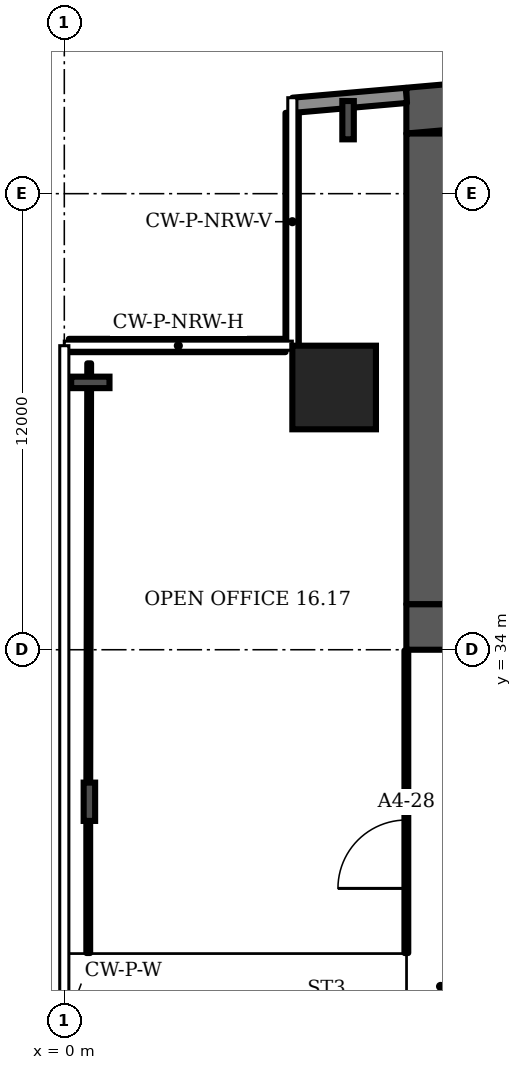
"""IFC4 building model, lengths in metres.
Left out: names, types, materials, properties, quantities, classifications, styles, units other than length and angle.
Written with IfcOpenShell. Run it as: python <this file> out.ifc"""

import sys

from ifc_helpers import new_model, si_unit, direction, frame, frame_2d, origin, origin_2d, place, context, subcontext, project, spatial, polyline, rectangle, i_section, outline, extrude, element, fill, save


model = new_model("IFC4")
c1 = context("Model", 3, precision=1e-05, world=origin(), true_north=direction((0.0, 1.0)))
c2 = subcontext(c1, "Body", "Model", "MODEL_VIEW")
j1 = project(units=[si_unit("LENGTHUNIT", "METRE"), si_unit("PLANEANGLEUNIT", "RADIAN")], contexts=[c1])
p1 = place(None, origin())
s1 = spatial("IfcSite", under=j1, at=p1, CompositionType="ELEMENT")
p2 = place(p1, origin())
s2 = spatial("IfcBuilding", under=s1, at=p2, CompositionType="ELEMENT")
p3 = place(p2, frame((0.0, 0.0, 77.5)))
s3 = spatial("IfcBuildingStorey", under=s2, at=p3, CompositionType="ELEMENT", Elevation=77.5)
p4 = place(p3, origin())
e1 = element("IfcWall", 1, at=p4, inside=s3, PredefinedType="SHEAR", context=c2, shape_type="SweptSolid", body=[
    extrude(outline(polyline([(9.0, 47.583), (37.0, 50.032), (65.0, 47.583), (65.0, 48.787), (37.0, 51.237), (9.0, 48.787), (9.0, 47.583)])), origin(), (0.0, 0.0, 1.0), 3.6),
])
p5 = place(p3, frame((9.0, 34.6, 0.0), z_axis=(0.0, 0.0, 1.0), x_axis=(1.0, 0.0, 0.0)))
e2 = element("IfcWall", 2, at=p5, inside=s3, PredefinedType="SHEAR", context=c2, shape_type="SweptSolid", body=[
    extrude(rectangle(XDim=56.0, YDim=1.2, at=frame_2d((28.0, 0.0))), origin(), (0.0, 0.0, 1.0), 3.6),
])
p6 = place(p5, frame((3.3, 0.0, 0.0)))
e3 = element("IfcOpeningElement", 3, at=p6, cuts=e2, PredefinedType="OPENING", context=c2, shape_type="SweptSolid", body=[
    extrude(rectangle(XDim=1.0, YDim=2.1, at=frame_2d((0.5, 1.05))), frame((0.0, 0.61, 0.0), z_axis=(0.0, -1.0, 0.0), x_axis=(1.0, 0.0, 0.0)), (0.0, 0.0, 1.0), 1.22),
])
p7 = place(p5, frame((7.867, 0.0, 0.0)))
e4 = element("IfcOpeningElement", 4, at=p7, cuts=e2, PredefinedType="OPENING", context=c2, shape_type="SweptSolid", body=[
    extrude(rectangle(XDim=1.1, YDim=2.1, at=frame_2d((0.55, 1.05))), frame((0.0, 0.61, 0.0), z_axis=(0.0, -1.0, 0.0), x_axis=(1.0, 0.0, 0.0)), (0.0, 0.0, 1.0), 1.22),
])
p8 = place(p5, frame((12.033, 0.0, 0.0)))
e5 = element("IfcOpeningElement", 5, at=p8, cuts=e2, PredefinedType="OPENING", context=c2, shape_type="SweptSolid", body=[
    extrude(rectangle(XDim=1.1, YDim=2.1, at=frame_2d((0.55, 1.05))), frame((0.0, 0.61, 0.0), z_axis=(0.0, -1.0, 0.0), x_axis=(1.0, 0.0, 0.0)), (0.0, 0.0, 1.0), 1.22),
])
p9 = place(p5, frame((9.8, 0.0, 0.0)))
e6 = element("IfcOpeningElement", 6, at=p9, cuts=e2, PredefinedType="OPENING", context=c2, shape_type="SweptSolid", body=[
    extrude(rectangle(XDim=1.4, YDim=2.1, at=frame_2d((0.7, 1.05))), frame((0.0, 0.61, 0.0), z_axis=(0.0, -1.0, 0.0), x_axis=(1.0, 0.0, 0.0)), (0.0, 0.0, 1.0), 1.22),
])
p10 = place(p5, frame((14.65, 0.0, 0.0)))
e7 = element("IfcOpeningElement", 7, at=p10, cuts=e2, PredefinedType="OPENING", context=c2, shape_type="SweptSolid", body=[
    extrude(rectangle(XDim=1.2, YDim=2.1, at=frame_2d((0.6, 1.05))), frame((0.0, 0.61, 0.0), z_axis=(0.0, -1.0, 0.0), x_axis=(1.0, 0.0, 0.0)), (0.0, 0.0, 1.0), 1.22),
])
p11 = place(p5, frame((21.867, 0.0, 0.0)))
e8 = element("IfcOpeningElement", 8, at=p11, cuts=e2, PredefinedType="OPENING", context=c2, shape_type="SweptSolid", body=[
    extrude(rectangle(XDim=1.1, YDim=2.1, at=frame_2d((0.55, 1.05))), frame((0.0, 0.61, 0.0), z_axis=(0.0, -1.0, 0.0), x_axis=(1.0, 0.0, 0.0)), (0.0, 0.0, 1.0), 1.22),
])
p12 = place(p5, frame((26.033, 0.0, 0.0)))
e9 = element("IfcOpeningElement", 9, at=p12, cuts=e2, PredefinedType="OPENING", context=c2, shape_type="SweptSolid", body=[
    extrude(rectangle(XDim=1.1, YDim=2.1, at=frame_2d((0.55, 1.05))), frame((0.0, 0.61, 0.0), z_axis=(0.0, -1.0, 0.0), x_axis=(1.0, 0.0, 0.0)), (0.0, 0.0, 1.0), 1.22),
])
p13 = place(p5, frame((23.8, 0.0, 0.0)))
e10 = element("IfcOpeningElement", 10, at=p13, cuts=e2, PredefinedType="OPENING", context=c2, shape_type="SweptSolid", body=[
    extrude(rectangle(XDim=1.4, YDim=2.1, at=frame_2d((0.7, 1.05))), frame((0.0, 0.61, 0.0), z_axis=(0.0, -1.0, 0.0), x_axis=(1.0, 0.0, 0.0)), (0.0, 0.0, 1.0), 1.22),
])
p14 = place(p5, frame((28.867, 0.0, 0.0)))
e11 = element("IfcOpeningElement", 11, at=p14, cuts=e2, PredefinedType="OPENING", context=c2, shape_type="SweptSolid", body=[
    extrude(rectangle(XDim=1.1, YDim=2.1, at=frame_2d((0.55, 1.05))), frame((0.0, 0.61, 0.0), z_axis=(0.0, -1.0, 0.0), x_axis=(1.0, 0.0, 0.0)), (0.0, 0.0, 1.0), 1.22),
])
p15 = place(p5, frame((33.033, 0.0, 0.0)))
e12 = element("IfcOpeningElement", 12, at=p15, cuts=e2, PredefinedType="OPENING", context=c2, shape_type="SweptSolid", body=[
    extrude(rectangle(XDim=1.1, YDim=2.1, at=frame_2d((0.55, 1.05))), frame((0.0, 0.61, 0.0), z_axis=(0.0, -1.0, 0.0), x_axis=(1.0, 0.0, 0.0)), (0.0, 0.0, 1.0), 1.22),
])
p16 = place(p5, frame((40.15, 0.0, 0.0)))
e13 = element("IfcOpeningElement", 13, at=p16, cuts=e2, PredefinedType="OPENING", context=c2, shape_type="SweptSolid", body=[
    extrude(rectangle(XDim=1.2, YDim=2.1, at=frame_2d((0.6, 1.05))), frame((0.0, 0.61, 0.0), z_axis=(0.0, -1.0, 0.0), x_axis=(1.0, 0.0, 0.0)), (0.0, 0.0, 1.0), 1.22),
])
p17 = place(p5, frame((44.8, 0.0, 0.0)))
e14 = element("IfcOpeningElement", 14, at=p17, cuts=e2, PredefinedType="OPENING", context=c2, shape_type="SweptSolid", body=[
    extrude(rectangle(XDim=1.4, YDim=2.1, at=frame_2d((0.7, 1.05))), frame((0.0, 0.61, 0.0), z_axis=(0.0, -1.0, 0.0), x_axis=(1.0, 0.0, 0.0)), (0.0, 0.0, 1.0), 1.22),
])
p18 = place(p5, frame((49.867, 0.0, 0.0)))
e15 = element("IfcOpeningElement", 15, at=p18, cuts=e2, PredefinedType="OPENING", context=c2, shape_type="SweptSolid", body=[
    extrude(rectangle(XDim=1.1, YDim=2.1, at=frame_2d((0.55, 1.05))), frame((0.0, 0.61, 0.0), z_axis=(0.0, -1.0, 0.0), x_axis=(1.0, 0.0, 0.0)), (0.0, 0.0, 1.0), 1.22),
])
p19 = place(p5, frame((53.5, 0.0, 0.0)))
e16 = element("IfcOpeningElement", 16, at=p19, cuts=e2, PredefinedType="OPENING", context=c2, shape_type="SweptSolid", body=[
    extrude(rectangle(XDim=1.1, YDim=2.1, at=frame_2d((0.55, 1.05))), frame((0.0, 0.61, 0.0), z_axis=(0.0, -1.0, 0.0), x_axis=(1.0, 0.0, 0.0)), (0.0, 0.0, 1.0), 1.22),
])
p20 = place(p5, frame((51.567, 0.0, 0.0)))
e17 = element("IfcOpeningElement", 17, at=p20, cuts=e2, PredefinedType="OPENING", context=c2, shape_type="SweptSolid", body=[
    extrude(rectangle(XDim=1.4, YDim=2.1, at=frame_2d((0.7, 1.05))), frame((0.0, 0.61, 0.0), z_axis=(0.0, -1.0, 0.0), x_axis=(1.0, 0.0, 0.0)), (0.0, 0.0, 1.0), 1.22),
])
p21 = place(p3, frame((9.6, 35.2, 0.0), z_axis=(0.0, 0.0, 1.0), x_axis=(0.0, 1.0, 0.0)))
e18 = element("IfcWall", 18, at=p21, inside=s3, PredefinedType="SHEAR", context=c2, shape_type="SweptSolid", body=[
    extrude(rectangle(XDim=12.383, YDim=1.2, at=frame_2d((6.191, 0.0))), origin(), (0.0, 0.0, 1.0), 3.6),
])
p22 = place(p3, frame((7.1, 40.9, 0.0), z_axis=(0.0, 0.0, 1.0), x_axis=(1.0, 0.0, 0.0)))
e19 = element("IfcColumn", 19, at=p22, inside=s3, PredefinedType="COLUMN", context=c2, shape_type="SweptSolid", body=[
    extrude(rectangle(XDim=2.2, YDim=2.2, at=origin_2d()), origin(), (0.0, 0.0, 1.0), 3.6),
])
for number, where, z_axis, x_axis in (
    (20, (7.467, 47.934, 0.0), (0.0, 0.0, 1.0), (-1.0, 0.0, 0.0)),
    (21, (0.685, 41.034, 0.0), (0.0, 0.0, 1.0), (0.0, 1.0, 0.0)),
    (22, (0.66, 30.0, 0.0), (0.0, 0.0, 1.0), (-1.0, 0.0, 0.0)),
):
    element("IfcColumn", number, at=place(p3, frame(where, z_axis=z_axis, x_axis=x_axis)), inside=s3, PredefinedType="COLUMN", context=c2, shape_type="SweptSolid", body=[
        extrude(i_section(OverallWidth=0.302, OverallDepth=1.008, WebThickness=0.021, FlangeThickness=0.04, FilletRadius=0.03, at=origin_2d()), origin(), (0.0, 0.0, 1.0), 3.6),
    ])
p23 = place(p3, frame((9.0, 48.587, 0.0), z_axis=(0.0, 0.0, 1.0), x_axis=(-0.996194, -0.087168, 0.0)))
e23 = element("IfcWall", 23, at=p23, inside=s3, PredefinedType="SOLIDWALL", context=c2, shape_type="SweptSolid", body=[
    extrude(rectangle(XDim=2.994, YDim=0.4, at=frame_2d((1.497, 0.0))), origin(), (0.0, 0.0, 1.0), 3.2),
])
p24 = place(p3, frame((5.995, 48.126, 0.0), z_axis=(0.0, 0.0, 1.0), x_axis=(0.0, -1.0, 0.0)))
e24 = element("IfcWall", 24, at=p24, inside=s3, PredefinedType="SOLIDWALL", context=c2, shape_type="SweptSolid", body=[
    extrude(rectangle(XDim=6.126, YDim=0.35, at=frame_2d((3.063, 0.0))), origin(), (0.0, 0.0, 1.0), 1.0),
])
p25 = place(p3, frame((5.82, 42.005, 0.0), z_axis=(0.0, 0.0, 1.0), x_axis=(-1.0, 0.0, 0.0)))
e25 = element("IfcWall", 25, at=p25, inside=s3, PredefinedType="SOLIDWALL", context=c2, shape_type="SweptSolid", body=[
    extrude(rectangle(XDim=5.7, YDim=0.35, at=frame_2d((2.85, 0.0))), origin(), (0.0, 0.0, 1.0), 1.0),
])
p26 = place(p3, frame((0.63, 26.02, 0.0), z_axis=(0.0, 0.0, 1.0), x_axis=(0.0, 1.0, 0.0)))
e26 = element("IfcWall", 26, at=p26, inside=s3, PredefinedType="PARTITIONING", context=c2, shape_type="SweptSolid", body=[
    extrude(rectangle(XDim=3.98, YDim=0.1, at=frame_2d((1.99, 0.0))), origin(), (0.0, 0.0, 1.0), 2.58),
])
p27 = place(p3, frame((0.63, 30.0, 0.0), z_axis=(0.0, 0.0, 1.0), x_axis=(0.00218, 0.999994, 0.0)))
e27 = element("IfcWall", 27, at=p27, inside=s3, PredefinedType="PARTITIONING", context=c2, shape_type="SweptSolid", body=[
    extrude(rectangle(XDim=11.535, YDim=0.1, at=frame_2d((5.768, 0.0))), origin(), (0.0, 0.0, 1.0), 2.58),
])
p28 = place(p3, frame((9.0, 26.02, 0.0), z_axis=(0.0, 0.0, 1.0), x_axis=(0.0, 1.0, 0.0)))
e28 = element("IfcWall", 28, at=p28, inside=s3, PredefinedType="PARTITIONING", context=c2, shape_type="SweptSolid", body=[
    extrude(rectangle(XDim=7.96, YDim=0.1, at=frame_2d((3.98, 0.0))), origin(), (0.0, 0.0, 1.0), 3.2),
])
p29 = place(p28, frame((1.7, 0.0, 0.0)))
e29 = element("IfcOpeningElement", 29, at=p29, cuts=e28, PredefinedType="OPENING", context=c2, shape_type="SweptSolid", body=[
    extrude(rectangle(XDim=1.8, YDim=2.1, at=frame_2d((0.9, 1.05))), frame((0.0, 0.06, 0.0), z_axis=(0.0, -1.0, 0.0), x_axis=(1.0, 0.0, 0.0)), (0.0, 0.0, 1.0), 0.12),
])
p30 = place(p29, origin())
e30 = element("IfcDoor", 30, at=p30, inside=s3, OperationType="DOUBLE_DOOR_SINGLE_SWING", PredefinedType="DOOR", context=c2, shape_type="SweptSolid", body=[
    extrude(rectangle(XDim=1.8, YDim=2.1, at=frame_2d((0.9, 1.05))), frame((0.0, 0.025, 0.0), z_axis=(0.0, -1.0, 0.0), x_axis=(1.0, 0.0, 0.0)), (0.0, 0.0, 1.0), 0.05),
])
fill(e29, e30)
save(model, sys.argv[1])
